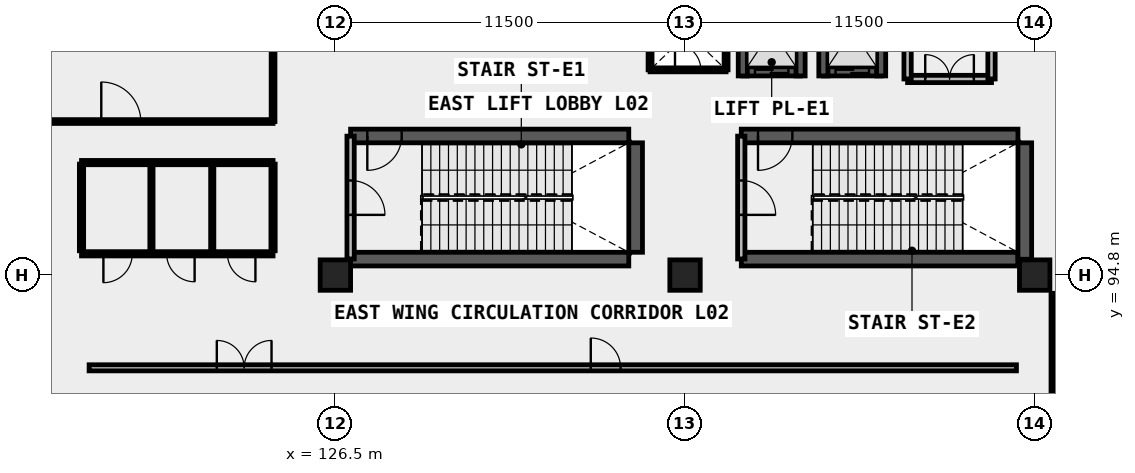
"""IFC4 building model, lengths in metres.
Left out: names, types, materials, properties, quantities, classifications, styles, units other than length and angle.
Written with IfcOpenShell. Run it as: python <this file> out.ifc"""

import sys

from ifc_helpers import new_model, si_unit, direction, frame, frame_2d, origin, origin_2d, place, context, subcontext, project, spatial, rectangle, extrude, element, fill, save


model = new_model("IFC4")
c1 = context("Model", 3, precision=1e-05, world=origin(), true_north=direction((0.0, 1.0)))
c2 = subcontext(c1, "Body", "Model", "MODEL_VIEW")
j1 = project(units=[si_unit("LENGTHUNIT", "METRE"), si_unit("PLANEANGLEUNIT", "RADIAN")], contexts=[c1])
p1 = place(None, origin())
s1 = spatial("IfcSite", under=j1, at=p1, CompositionType="ELEMENT")
p2 = place(p1, origin())
s2 = spatial("IfcBuilding", under=s1, at=p2, CompositionType="ELEMENT")
p3 = place(p2, frame((0.0, 0.0, 8.4)))
s3 = spatial("IfcBuildingStorey", under=s2, at=p3, CompositionType="ELEMENT", Elevation=8.4)
for number, where, z_axis, x_axis in (
    (1, (126.5, 94.8, 0.0), (0.0, 0.0, 1.0), (1.0, 0.0, 0.0)),
    (2, (138.0, 94.8, 0.0), (0.0, 0.0, 1.0), (1.0, 0.0, 0.0)),
    (3, (149.5, 94.8, 0.0), (0.0, 0.0, 1.0), (1.0, 0.0, 0.0)),
):
    element("IfcColumn", number, at=place(p3, frame(where, z_axis=z_axis, x_axis=x_axis)), inside=s3, PredefinedType="COLUMN", context=c2, shape_type="SweptSolid", body=[
        extrude(rectangle(XDim=1.0, YDim=1.0, at=origin_2d()), origin(), (0.0, 0.0, 1.0), 5.4),
    ])
p4 = place(p3, frame((139.9, 101.5, 0.0), z_axis=(0.0, 0.0, 1.0), x_axis=(1.0, 0.0, 0.0)))
e4 = element("IfcWall", 4, at=p4, inside=s3, PredefinedType="SHEAR", context=c2, shape_type="SweptSolid", body=[
    extrude(rectangle(XDim=1.9, YDim=0.3, at=frame_2d((0.95, 0.0))), origin(), (0.0, 0.0, 1.0), 5.4),
])
p5 = place(p4, frame((0.4, 0.0, 0.0)))
e5 = element("IfcOpeningElement", 5, at=p5, cuts=e4, PredefinedType="OPENING", context=c2, shape_type="SweptSolid", body=[
    extrude(rectangle(XDim=1.1, YDim=2.15, at=frame_2d((0.55, 1.075))), frame((0.0, 0.16, 0.0), z_axis=(0.0, -1.0, 0.0), x_axis=(1.0, 0.0, 0.0)), (0.0, 0.0, 1.0), 0.32),
])
for number, where, z_axis, x_axis in (
    (6, (139.9, 101.35, 0.0), (0.0, 0.0, 1.0), (0.0, 1.0, 0.0)),
    (7, (141.8, 101.35, 0.0), (0.0, 0.0, 1.0), (0.0, 1.0, 0.0)),
):
    element("IfcWall", number, at=place(p3, frame(where, z_axis=z_axis, x_axis=x_axis)), inside=s3, PredefinedType="SHEAR", context=c2, shape_type="SweptSolid", body=[
        extrude(rectangle(XDim=3.0, YDim=0.3, at=frame_2d((1.5, 0.0))), origin(), (0.0, 0.0, 1.0), 5.4),
    ])
p6 = place(p3, frame((142.55, 101.5, 0.0), z_axis=(0.0, 0.0, 1.0), x_axis=(1.0, 0.0, 0.0)))
e8 = element("IfcWall", 8, at=p6, inside=s3, PredefinedType="SHEAR", context=c2, shape_type="SweptSolid", body=[
    extrude(rectangle(XDim=1.9, YDim=0.3, at=frame_2d((0.95, 0.0))), origin(), (0.0, 0.0, 1.0), 5.4),
])
p7 = place(p6, frame((0.4, 0.0, 0.0)))
e9 = element("IfcOpeningElement", 9, at=p7, cuts=e8, PredefinedType="OPENING", context=c2, shape_type="SweptSolid", body=[
    extrude(rectangle(XDim=1.1, YDim=2.15, at=frame_2d((0.55, 1.075))), frame((0.0, 0.16, 0.0), z_axis=(0.0, -1.0, 0.0), x_axis=(1.0, 0.0, 0.0)), (0.0, 0.0, 1.0), 0.32),
])
for number, where, z_axis, x_axis in (
    (10, (142.55, 101.35, 0.0), (0.0, 0.0, 1.0), (0.0, 1.0, 0.0)),
    (11, (144.45, 101.35, 0.0), (0.0, 0.0, 1.0), (0.0, 1.0, 0.0)),
):
    element("IfcWall", number, at=place(p3, frame(where, z_axis=z_axis, x_axis=x_axis)), inside=s3, PredefinedType="SHEAR", context=c2, shape_type="SweptSolid", body=[
        extrude(rectangle(XDim=3.0, YDim=0.3, at=frame_2d((1.5, 0.0))), origin(), (0.0, 0.0, 1.0), 5.4),
    ])
p8 = place(p3, frame((127.0, 95.325, 0.0), z_axis=(0.0, 0.0, 1.0), x_axis=(1.0, 0.0, 0.0)))
e12 = element("IfcWall", 12, at=p8, inside=s3, PredefinedType="SHEAR", context=c2, shape_type="SweptSolid", body=[
    extrude(rectangle(XDim=9.15, YDim=0.45, at=frame_2d((4.575, 0.0))), origin(), (0.0, 0.0, 1.0), 5.4),
])
p9 = place(p3, frame((127.0, 99.375, 0.0), z_axis=(0.0, 0.0, 1.0), x_axis=(1.0, 0.0, 0.0)))
e13 = element("IfcWall", 13, at=p9, inside=s3, PredefinedType="SHEAR", context=c2, shape_type="SweptSolid", body=[
    extrude(rectangle(XDim=9.15, YDim=0.45, at=frame_2d((4.575, 0.0))), origin(), (0.0, 0.0, 1.0), 5.4),
])
p10 = place(p9, frame((0.55, 0.0, 0.0)))
e14 = element("IfcOpeningElement", 14, at=p10, cuts=e13, PredefinedType="OPENING", context=c2, shape_type="SweptSolid", body=[
    extrude(rectangle(XDim=1.13, YDim=2.15, at=frame_2d((0.565, 1.075))), frame((0.0, 0.235, 0.0), z_axis=(0.0, -1.0, 0.0), x_axis=(1.0, 0.0, 0.0)), (0.0, 0.0, 1.0), 0.47),
])
p11 = place(p3, frame((136.375, 95.55, 0.0), z_axis=(0.0, 0.0, 1.0), x_axis=(0.0, 1.0, 0.0)))
e15 = element("IfcWall", 15, at=p11, inside=s3, PredefinedType="SHEAR", context=c2, shape_type="SweptSolid", body=[
    extrude(rectangle(XDim=3.6, YDim=0.45, at=frame_2d((1.8, 0.0))), origin(), (0.0, 0.0, 1.0), 5.4),
])
p12 = place(p3, frame((139.85, 95.325, 0.0), z_axis=(0.0, 0.0, 1.0), x_axis=(1.0, 0.0, 0.0)))
e16 = element("IfcWall", 16, at=p12, inside=s3, PredefinedType="SHEAR", context=c2, shape_type="SweptSolid", body=[
    extrude(rectangle(XDim=9.1, YDim=0.45, at=frame_2d((4.55, 0.0))), origin(), (0.0, 0.0, 1.0), 5.4),
])
p13 = place(p3, frame((139.85, 99.375, 0.0), z_axis=(0.0, 0.0, 1.0), x_axis=(1.0, 0.0, 0.0)))
e17 = element("IfcWall", 17, at=p13, inside=s3, PredefinedType="SHEAR", context=c2, shape_type="SweptSolid", body=[
    extrude(rectangle(XDim=9.1, YDim=0.45, at=frame_2d((4.55, 0.0))), origin(), (0.0, 0.0, 1.0), 5.4),
])
p14 = place(p13, frame((0.55, 0.0, 0.0)))
e18 = element("IfcOpeningElement", 18, at=p14, cuts=e17, PredefinedType="OPENING", context=c2, shape_type="SweptSolid", body=[
    extrude(rectangle(XDim=1.13, YDim=2.15, at=frame_2d((0.565, 1.075))), frame((0.0, 0.235, 0.0), z_axis=(0.0, -1.0, 0.0), x_axis=(1.0, 0.0, 0.0)), (0.0, 0.0, 1.0), 0.47),
])
p15 = place(p3, frame((149.175, 95.32, 0.0), z_axis=(0.0, 0.0, 1.0), x_axis=(0.0, 1.0, 0.0)))
e19 = element("IfcWall", 19, at=p15, inside=s3, PredefinedType="SHEAR", context=c2, shape_type="SweptSolid", body=[
    extrude(rectangle(XDim=3.83, YDim=0.45, at=frame_2d((1.915, 0.0))), origin(), (0.0, 0.0, 1.0), 5.4),
])
p16 = place(p3, frame((127.0, 95.33, 0.0), z_axis=(0.0, 0.0, 1.0), x_axis=(0.0, 1.0, 0.0)))
e20 = element("IfcWall", 20, at=p16, inside=s3, PredefinedType="SOLIDWALL", context=c2, shape_type="SweptSolid", body=[
    extrude(rectangle(XDim=4.04, YDim=0.24, at=frame_2d((2.02, 0.0))), origin(), (0.0, 0.0, 1.0), 5.12),
])
p17 = place(p16, frame((1.45, 0.0, 0.0)))
e21 = element("IfcOpeningElement", 21, at=p17, cuts=e20, PredefinedType="OPENING", context=c2, shape_type="SweptSolid", body=[
    extrude(rectangle(XDim=1.13, YDim=2.15, at=frame_2d((0.565, 1.075))), frame((0.0, 0.13, 0.0), z_axis=(0.0, -1.0, 0.0), x_axis=(1.0, 0.0, 0.0)), (0.0, 0.0, 1.0), 0.26),
])
p18 = place(p3, frame((139.85, 95.33, 0.0), z_axis=(0.0, 0.0, 1.0), x_axis=(0.0, 1.0, 0.0)))
e22 = element("IfcWall", 22, at=p18, inside=s3, PredefinedType="SOLIDWALL", context=c2, shape_type="SweptSolid", body=[
    extrude(rectangle(XDim=4.04, YDim=0.24, at=frame_2d((2.02, 0.0))), origin(), (0.0, 0.0, 1.0), 5.12),
])
p19 = place(p18, frame((1.45, 0.0, 0.0)))
e23 = element("IfcOpeningElement", 23, at=p19, cuts=e22, PredefinedType="OPENING", context=c2, shape_type="SweptSolid", body=[
    extrude(rectangle(XDim=1.13, YDim=2.15, at=frame_2d((0.565, 1.075))), frame((0.0, 0.13, 0.0), z_axis=(0.0, -1.0, 0.0), x_axis=(1.0, 0.0, 0.0)), (0.0, 0.0, 1.0), 0.26),
])
p20 = place(p3, frame((145.32, 101.25, 0.0), z_axis=(0.0, 0.0, 1.0), x_axis=(1.0, 0.0, 0.0)))
e24 = element("IfcWall", 24, at=p20, inside=s3, PredefinedType="SOLIDWALL", context=c2, shape_type="SweptSolid", body=[
    extrude(rectangle(XDim=2.76, YDim=0.24, at=frame_2d((1.38, 0.0))), origin(), (0.0, 0.0, 1.0), 5.12),
])
p21 = place(p20, frame((0.58, 0.0, 0.0)))
e25 = element("IfcOpeningElement", 25, at=p21, cuts=e24, PredefinedType="OPENING", context=c2, shape_type="SweptSolid", body=[
    extrude(rectangle(XDim=1.6, YDim=2.15, at=frame_2d((0.8, 1.075))), frame((0.0, 0.13, 0.0), z_axis=(0.0, -1.0, 0.0), x_axis=(1.0, 0.0, 0.0)), (0.0, 0.0, 1.0), 0.26),
])
for number, where, z_axis, x_axis in (
    (26, (145.32, 101.25, 0.0), (0.0, 0.0, 1.0), (0.0, 1.0, 0.0)),
    (27, (148.08, 101.25, 0.0), (0.0, 0.0, 1.0), (0.0, 1.0, 0.0)),
):
    element("IfcWall", number, at=place(p3, frame(where, z_axis=z_axis, x_axis=x_axis)), inside=s3, PredefinedType="SOLIDWALL", context=c2, shape_type="SweptSolid", body=[
        extrude(rectangle(XDim=2.6, YDim=0.24, at=frame_2d((1.3, 0.0))), origin(), (0.0, 0.0, 1.0), 5.12),
    ])
p22 = place(p3, frame((136.85, 101.55, 0.0), z_axis=(0.0, 0.0, 1.0), x_axis=(1.0, 0.0, 0.0)))
e28 = element("IfcWall", 28, at=p22, inside=s3, PredefinedType="PLUMBINGWALL", context=c2, shape_type="SweptSolid", body=[
    extrude(rectangle(XDim=2.5, YDim=0.13, at=frame_2d((1.25, 0.0))), origin(), (0.0, 0.0, 1.0), 5.12),
])
p23 = place(p22, frame((0.82, 0.0, 0.0)))
e29 = element("IfcOpeningElement", 29, at=p23, cuts=e28, PredefinedType="OPENING", context=c2, shape_type="SweptSolid", body=[
    extrude(rectangle(XDim=0.85, YDim=2.0, at=frame_2d((0.425, 1.0))), frame((0.0, 0.075, 0.0), z_axis=(0.0, -1.0, 0.0), x_axis=(1.0, 0.0, 0.0)), (0.0, 0.0, 1.0), 0.15),
])
for number, where, z_axis, x_axis in (
    (30, (136.85, 101.55, 0.0), (0.0, 0.0, 1.0), (0.0, 1.0, 0.0)),
    (31, (139.35, 101.55, 0.0), (0.0, 0.0, 1.0), (0.0, 1.0, 0.0)),
):
    element("IfcWall", number, at=place(p3, frame(where, z_axis=z_axis, x_axis=x_axis)), inside=s3, PredefinedType="PLUMBINGWALL", context=c2, shape_type="SweptSolid", body=[
        extrude(rectangle(XDim=2.4, YDim=0.13, at=frame_2d((1.2, 0.0))), origin(), (0.0, 0.0, 1.0), 5.12),
    ])
p24 = place(p3, frame((118.15, 95.5, 0.0), z_axis=(0.0, 0.0, 1.0), x_axis=(1.0, 0.0, 0.0)))
e32 = element("IfcWall", 32, at=p24, inside=s3, PredefinedType="PLUMBINGWALL", context=c2, shape_type="SweptSolid", body=[
    extrude(rectangle(XDim=6.3, YDim=0.14, at=frame_2d((3.15, 0.0))), origin(), (0.0, 0.0, 1.0), 5.12),
])
p25 = place(p24, frame((0.72, 0.0, 0.0)))
e33 = element("IfcOpeningElement", 33, at=p25, cuts=e32, PredefinedType="OPENING", context=c2, shape_type="SweptSolid", body=[
    extrude(rectangle(XDim=0.95, YDim=2.1, at=frame_2d((0.475, 1.05))), frame((0.0, 0.08, 0.0), z_axis=(0.0, -1.0, 0.0), x_axis=(1.0, 0.0, 0.0)), (0.0, 0.0, 1.0), 0.16),
])
p26 = place(p24, frame((2.8, 0.0, 0.0)))
e34 = element("IfcOpeningElement", 34, at=p26, cuts=e32, PredefinedType="OPENING", context=c2, shape_type="SweptSolid", body=[
    extrude(rectangle(XDim=0.92, YDim=2.1, at=frame_2d((0.46, 1.05))), frame((0.0, 0.08, 0.0), z_axis=(0.0, -1.0, 0.0), x_axis=(1.0, 0.0, 0.0)), (0.0, 0.0, 1.0), 0.16),
])
p27 = place(p24, frame((4.8, 0.0, 0.0)))
e35 = element("IfcOpeningElement", 35, at=p27, cuts=e32, PredefinedType="OPENING", context=c2, shape_type="SweptSolid", body=[
    extrude(rectangle(XDim=0.92, YDim=2.1, at=frame_2d((0.46, 1.05))), frame((0.0, 0.08, 0.0), z_axis=(0.0, -1.0, 0.0), x_axis=(1.0, 0.0, 0.0)), (0.0, 0.0, 1.0), 0.16),
])
p28 = place(p3, frame((118.15, 95.6, 0.0), z_axis=(0.0, 0.0, 1.0), x_axis=(0.0, 1.0, 0.0)))
e36 = element("IfcWall", 36, at=p28, inside=s3, PredefinedType="PLUMBINGWALL", context=c2, shape_type="SweptSolid", body=[
    extrude(rectangle(XDim=2.85, YDim=0.14, at=frame_2d((1.425, 0.0))), origin(), (0.0, 0.0, 1.0), 5.12),
])
for number, where, z_axis, x_axis in (
    (37, (120.45, 95.6, 0.0), (0.0, 0.0, 1.0), (0.0, 1.0, 0.0)),
    (38, (122.45, 95.6, 0.0), (0.0, 0.0, 1.0), (0.0, 1.0, 0.0)),
):
    element("IfcWall", number, at=place(p3, frame(where, z_axis=z_axis, x_axis=x_axis)), inside=s3, PredefinedType="PARTITIONING", context=c2, shape_type="SweptSolid", body=[
        extrude(rectangle(XDim=2.85, YDim=0.105, at=frame_2d((1.425, 0.0))), origin(), (0.0, 0.0, 1.0), 5.12),
    ])
p29 = place(p3, frame((124.45, 95.6, 0.0), z_axis=(0.0, 0.0, 1.0), x_axis=(0.0, 1.0, 0.0)))
e39 = element("IfcWall", 39, at=p29, inside=s3, PredefinedType="PLUMBINGWALL", context=c2, shape_type="SweptSolid", body=[
    extrude(rectangle(XDim=2.85, YDim=0.14, at=frame_2d((1.425, 0.0))), origin(), (0.0, 0.0, 1.0), 5.12),
])
p30 = place(p3, frame((118.15, 98.5, 0.0), z_axis=(0.0, 0.0, 1.0), x_axis=(1.0, 0.0, 0.0)))
e40 = element("IfcWall", 40, at=p30, inside=s3, PredefinedType="PLUMBINGWALL", context=c2, shape_type="SweptSolid", body=[
    extrude(rectangle(XDim=6.3, YDim=0.14, at=frame_2d((3.15, 0.0))), origin(), (0.0, 0.0, 1.0), 5.12),
])
p31 = place(p3, frame((118.4, 91.75, 0.0), z_axis=(0.0, 0.0, 1.0), x_axis=(1.0, 0.0, 0.0)))
e41 = element("IfcWall", 41, at=p31, inside=s3, PredefinedType="PARTITIONING", context=c2, shape_type="SweptSolid", body=[
    extrude(rectangle(XDim=30.5, YDim=0.2, at=frame_2d((15.25, 0.0))), origin(), (0.0, 0.0, 1.0), 5.12),
])
p32 = place(p31, frame((4.2, 0.0, 0.0)))
e42 = element("IfcOpeningElement", 42, at=p32, cuts=e41, PredefinedType="OPENING", context=c2, shape_type="SweptSolid", body=[
    extrude(rectangle(XDim=1.8, YDim=2.2, at=frame_2d((0.9, 1.1))), frame((0.0, 0.11, 0.0), z_axis=(0.0, -1.0, 0.0), x_axis=(1.0, 0.0, 0.0)), (0.0, 0.0, 1.0), 0.22),
])
p33 = place(p31, frame((16.5, 0.0, 0.0)))
e43 = element("IfcOpeningElement", 43, at=p33, cuts=e41, PredefinedType="OPENING", context=c2, shape_type="SweptSolid", body=[
    extrude(rectangle(XDim=0.98, YDim=2.15, at=frame_2d((0.49, 1.075))), frame((0.0, 0.11, 0.0), z_axis=(0.0, -1.0, 0.0), x_axis=(1.0, 0.0, 0.0)), (0.0, 0.0, 1.0), 0.22),
])
p34 = place(p3, frame((115.16, 99.85, 0.0), z_axis=(0.0, 0.0, 1.0), x_axis=(1.0, 0.0, 0.0)))
e44 = element("IfcWall", 44, at=p34, inside=s3, PredefinedType="MOVABLE", context=c2, shape_type="SweptSolid", body=[
    extrude(rectangle(XDim=9.29, YDim=0.125, at=frame_2d((4.645, 0.0))), origin(), (0.0, 0.0, 1.0), 5.12),
])
p35 = place(p34, frame((3.64, 0.0, 0.0)))
e45 = element("IfcOpeningElement", 45, at=p35, cuts=e44, PredefinedType="OPENING", context=c2, shape_type="SweptSolid", body=[
    extrude(rectangle(XDim=1.3, YDim=2.2, at=frame_2d((0.65, 1.1))), frame((0.0, 0.073, 0.0), z_axis=(0.0, -1.0, 0.0), x_axis=(1.0, 0.0, 0.0)), (0.0, 0.0, 1.0), 0.145),
])
p36 = place(p3, frame((124.45, 99.85, 0.0), z_axis=(0.0, 0.0, 1.0), x_axis=(0.0, 1.0, 0.0)))
e46 = element("IfcWall", 46, at=p36, inside=s3, PredefinedType="MOVABLE", context=c2, shape_type="SweptSolid", body=[
    extrude(rectangle(XDim=14.55, YDim=0.125, at=frame_2d((7.275, 0.0))), origin(), (0.0, 0.0, 1.0), 5.12),
])
p37 = place(p3, frame((150.1, 86.4, 0.0), z_axis=(0.0, 0.0, 1.0), x_axis=(0.0, 1.0, 0.0)))
e47 = element("IfcWall", 47, at=p37, inside=s3, PredefinedType="MOVABLE", context=c2, shape_type="SweptSolid", body=[
    extrude(rectangle(XDim=7.8, YDim=0.125, at=frame_2d((3.9, 0.0))), origin(), (0.0, 0.0, 1.0), 5.12),
])
p38 = place(p37, frame((2.8, 0.0, 0.0)))
e48 = element("IfcOpeningElement", 48, at=p38, cuts=e47, PredefinedType="OPENING", context=c2, shape_type="SweptSolid", body=[
    extrude(rectangle(XDim=1.3, YDim=2.2, at=frame_2d((0.65, 1.1))), frame((0.0, 0.073, 0.0), z_axis=(0.0, -1.0, 0.0), x_axis=(1.0, 0.0, 0.0)), (0.0, 0.0, 1.0), 0.145),
])
p39 = place(p5, origin())
e49 = element("IfcDoor", 49, at=p39, inside=s3, OperationType="SLIDING_TO_LEFT", PredefinedType="DOOR", context=c2, shape_type="SweptSolid", body=[
    extrude(rectangle(XDim=1.1, YDim=2.15, at=frame_2d((0.55, 1.075))), frame((0.0, 0.025, 0.0), z_axis=(0.0, -1.0, 0.0), x_axis=(1.0, 0.0, 0.0)), (0.0, 0.0, 1.0), 0.05),
])
fill(e5, e49)
p40 = place(p7, origin())
e50 = element("IfcDoor", 50, at=p40, inside=s3, OperationType="SLIDING_TO_LEFT", PredefinedType="DOOR", context=c2, shape_type="SweptSolid", body=[
    extrude(rectangle(XDim=1.1, YDim=2.15, at=frame_2d((0.55, 1.075))), frame((0.0, 0.025, 0.0), z_axis=(0.0, -1.0, 0.0), x_axis=(1.0, 0.0, 0.0)), (0.0, 0.0, 1.0), 0.05),
])
fill(e9, e50)
p41 = place(p17, frame((0.565, 0.0, 0.0), z_axis=(0.0, 0.0, 1.0), x_axis=(-1.0, 0.0, 0.0)))
e51 = element("IfcDoor", 51, at=p41, inside=s3, OperationType="SINGLE_SWING_LEFT", PredefinedType="DOOR", context=c2, shape_type="SweptSolid", body=[
    extrude(rectangle(XDim=1.13, YDim=2.15, at=frame_2d((0.0, 1.075))), frame((0.0, 0.025, 0.0), z_axis=(0.0, -1.0, 0.0), x_axis=(1.0, 0.0, 0.0)), (0.0, 0.0, 1.0), 0.05),
])
fill(e21, e51)
p42 = place(p10, frame((0.565, 0.0, 0.0), z_axis=(0.0, 0.0, 1.0), x_axis=(-1.0, 0.0, 0.0)))
e52 = element("IfcDoor", 52, at=p42, inside=s3, OperationType="SINGLE_SWING_LEFT", PredefinedType="DOOR", context=c2, shape_type="SweptSolid", body=[
    extrude(rectangle(XDim=1.13, YDim=2.15, at=frame_2d((0.0, 1.075))), frame((0.0, 0.025, 0.0), z_axis=(0.0, -1.0, 0.0), x_axis=(1.0, 0.0, 0.0)), (0.0, 0.0, 1.0), 0.05),
])
fill(e14, e52)
p43 = place(p19, frame((0.565, 0.0, 0.0), z_axis=(0.0, 0.0, 1.0), x_axis=(-1.0, 0.0, 0.0)))
e53 = element("IfcDoor", 53, at=p43, inside=s3, OperationType="SINGLE_SWING_LEFT", PredefinedType="DOOR", context=c2, shape_type="SweptSolid", body=[
    extrude(rectangle(XDim=1.13, YDim=2.15, at=frame_2d((0.0, 1.075))), frame((0.0, 0.025, 0.0), z_axis=(0.0, -1.0, 0.0), x_axis=(1.0, 0.0, 0.0)), (0.0, 0.0, 1.0), 0.05),
])
fill(e23, e53)
p44 = place(p14, frame((0.565, 0.0, 0.0), z_axis=(0.0, 0.0, 1.0), x_axis=(-1.0, 0.0, 0.0)))
e54 = element("IfcDoor", 54, at=p44, inside=s3, OperationType="SINGLE_SWING_LEFT", PredefinedType="DOOR", context=c2, shape_type="SweptSolid", body=[
    extrude(rectangle(XDim=1.13, YDim=2.15, at=frame_2d((0.0, 1.075))), frame((0.0, 0.025, 0.0), z_axis=(0.0, -1.0, 0.0), x_axis=(1.0, 0.0, 0.0)), (0.0, 0.0, 1.0), 0.05),
])
fill(e18, e54)
p45 = place(p21, origin())
e55 = element("IfcDoor", 55, at=p45, inside=s3, OperationType="DOUBLE_DOOR_SINGLE_SWING", PredefinedType="DOOR", context=c2, shape_type="SweptSolid", body=[
    extrude(rectangle(XDim=1.6, YDim=2.15, at=frame_2d((0.8, 1.075))), frame((0.0, 0.025, 0.0), z_axis=(0.0, -1.0, 0.0), x_axis=(1.0, 0.0, 0.0)), (0.0, 0.0, 1.0), 0.05),
])
fill(e25, e55)
p46 = place(p23, origin())
e56 = element("IfcDoor", 56, at=p46, inside=s3, OperationType="SINGLE_SWING_LEFT", PredefinedType="TRAPDOOR", context=c2, shape_type="SweptSolid", body=[
    extrude(rectangle(XDim=0.85, YDim=2.0, at=frame_2d((0.425, 1.0))), frame((0.0, 0.025, 0.0), z_axis=(0.0, -1.0, 0.0), x_axis=(1.0, 0.0, 0.0)), (0.0, 0.0, 1.0), 0.05),
])
fill(e29, e56)
p47 = place(p25, frame((0.475, 0.0, 0.0), z_axis=(0.0, 0.0, 1.0), x_axis=(-1.0, 0.0, 0.0)))
e57 = element("IfcDoor", 57, at=p47, inside=s3, OperationType="SINGLE_SWING_LEFT", PredefinedType="DOOR", context=c2, shape_type="SweptSolid", body=[
    extrude(rectangle(XDim=0.95, YDim=2.1, at=frame_2d((0.0, 1.05))), frame((0.0, 0.025, 0.0), z_axis=(0.0, -1.0, 0.0), x_axis=(1.0, 0.0, 0.0)), (0.0, 0.0, 1.0), 0.05),
])
fill(e33, e57)
p48 = place(p26, origin())
e58 = element("IfcDoor", 58, at=p48, inside=s3, OperationType="SINGLE_SWING_RIGHT", PredefinedType="DOOR", context=c2, shape_type="SweptSolid", body=[
    extrude(rectangle(XDim=0.92, YDim=2.1, at=frame_2d((0.46, 1.05))), frame((0.0, 0.025, 0.0), z_axis=(0.0, -1.0, 0.0), x_axis=(1.0, 0.0, 0.0)), (0.0, 0.0, 1.0), 0.05),
])
fill(e34, e58)
p49 = place(p27, origin())
e59 = element("IfcDoor", 59, at=p49, inside=s3, OperationType="SINGLE_SWING_RIGHT", PredefinedType="DOOR", context=c2, shape_type="SweptSolid", body=[
    extrude(rectangle(XDim=0.92, YDim=2.1, at=frame_2d((0.46, 1.05))), frame((0.0, 0.025, 0.0), z_axis=(0.0, -1.0, 0.0), x_axis=(1.0, 0.0, 0.0)), (0.0, 0.0, 1.0), 0.05),
])
fill(e35, e59)
p50 = place(p32, origin())
e60 = element("IfcDoor", 60, at=p50, inside=s3, OperationType="DOUBLE_DOOR_SINGLE_SWING", PredefinedType="DOOR", context=c2, shape_type="SweptSolid", body=[
    extrude(rectangle(XDim=1.8, YDim=2.2, at=frame_2d((0.9, 1.1))), frame((0.0, 0.025, 0.0), z_axis=(0.0, -1.0, 0.0), x_axis=(1.0, 0.0, 0.0)), (0.0, 0.0, 1.0), 0.05),
])
fill(e42, e60)
p51 = place(p33, origin())
e61 = element("IfcDoor", 61, at=p51, inside=s3, OperationType="SINGLE_SWING_LEFT", PredefinedType="DOOR", context=c2, shape_type="SweptSolid", body=[
    extrude(rectangle(XDim=0.98, YDim=2.15, at=frame_2d((0.49, 1.075))), frame((0.0, 0.025, 0.0), z_axis=(0.0, -1.0, 0.0), x_axis=(1.0, 0.0, 0.0)), (0.0, 0.0, 1.0), 0.05),
])
fill(e43, e61)
p52 = place(p35, origin())
e62 = element("IfcDoor", 62, at=p52, inside=s3, OperationType="SINGLE_SWING_LEFT", PredefinedType="DOOR", context=c2, shape_type="SweptSolid", body=[
    extrude(rectangle(XDim=1.3, YDim=2.2, at=frame_2d((0.65, 1.1))), frame((0.0, 0.025, 0.0), z_axis=(0.0, -1.0, 0.0), x_axis=(1.0, 0.0, 0.0)), (0.0, 0.0, 1.0), 0.05),
])
fill(e45, e62)
save(model, sys.argv[1])
